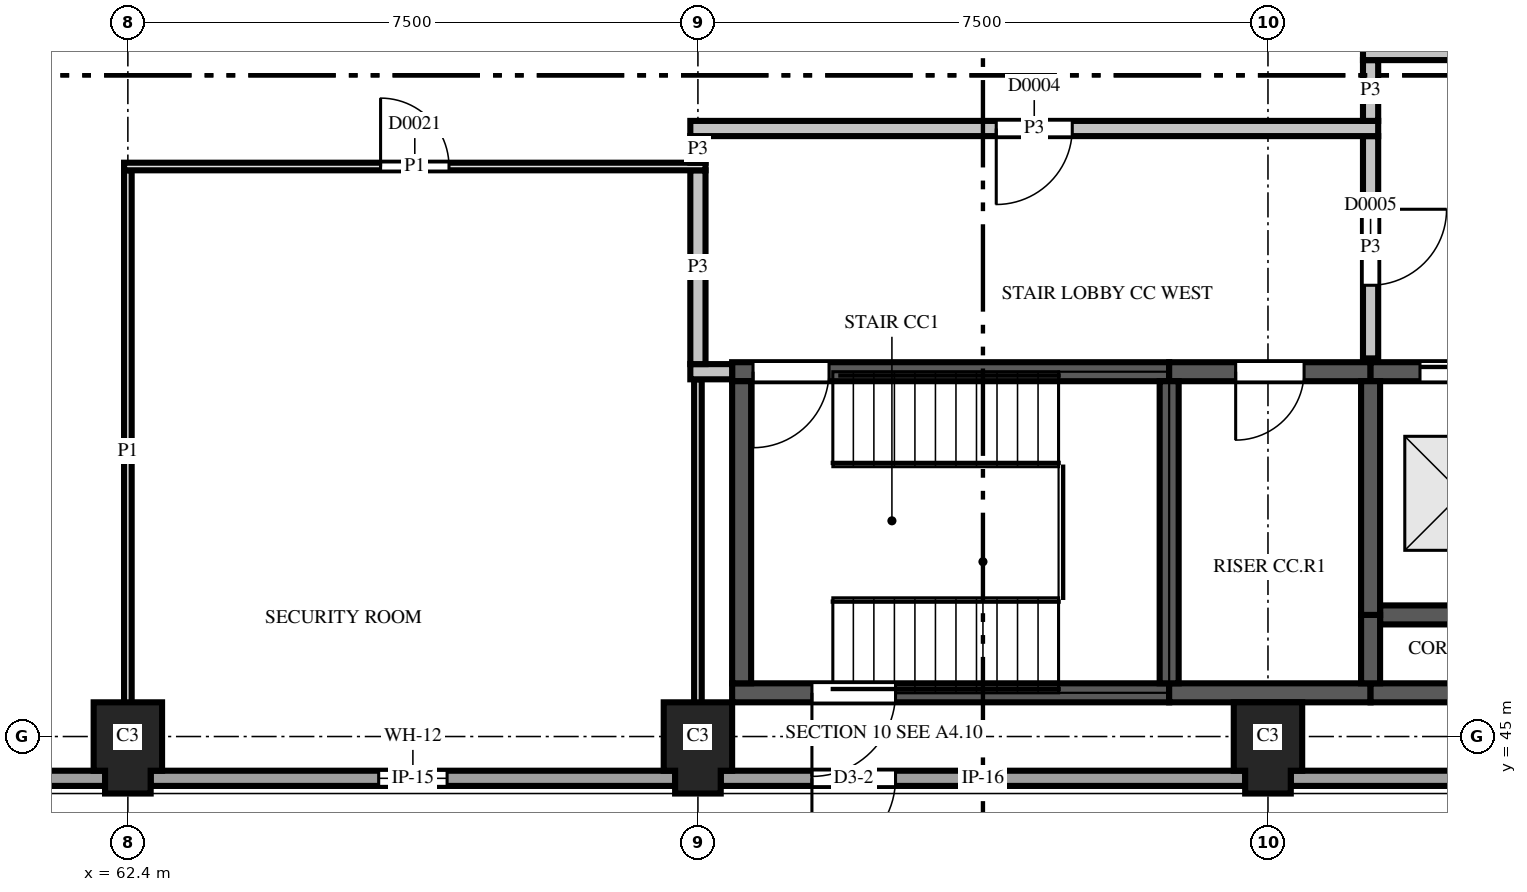
"""IFC4 building model, lengths in metres.
Left out: names, types, materials, properties, quantities, classifications, styles, units other than length and angle.
Written with IfcOpenShell. Run it as: python <this file> out.ifc"""

import sys

from ifc_helpers import new_model, si_unit, direction, frame, frame_2d, origin, place, context, subcontext, project, spatial, polyline, rectangle, outline, extrude, element, fill, save


model = new_model("IFC4")
c1 = context("Model", 3, precision=1e-05, world=origin(), true_north=direction((0.0, 1.0)))
c2 = subcontext(c1, "Body", "Model", "MODEL_VIEW")
j1 = project(units=[si_unit("LENGTHUNIT", "METRE"), si_unit("PLANEANGLEUNIT", "RADIAN")], contexts=[c1])
p1 = place(None, origin())
s1 = spatial("IfcSite", under=j1, at=p1, CompositionType="ELEMENT")
p2 = place(p1, origin())
s2 = spatial("IfcBuilding", under=s1, at=p2, CompositionType="ELEMENT")
p3 = place(p2, origin())
s3 = spatial("IfcBuildingStorey", under=s2, at=p3, CompositionType="ELEMENT", Elevation=0.0)
for number, where, z_axis, x_axis in (
    (1, (62.4, 45.0, 0.0), (0.0, 0.0, 1.0), (0.0, -1.0, 0.0)),
    (2, (69.9, 45.0, 0.0), (0.0, 0.0, 1.0), (0.0, -1.0, 0.0)),
    (3, (77.4, 45.0, 0.0), (0.0, 0.0, 1.0), (0.0, -1.0, 0.0)),
):
    element("IfcColumn", number, at=place(p3, frame(where, z_axis=z_axis, x_axis=x_axis)), inside=s3, PredefinedType="COLUMN", context=c2, shape_type="SweptSolid", body=[
        extrude(outline(polyline([(-0.45, -0.45), (0.45, -0.45), (0.45, -0.3), (0.75, -0.3), (0.75, 0.3), (0.45, 0.3), (0.45, 0.45), (-0.45, 0.45), (-0.45, -0.45)])), origin(), (0.0, 0.0, 1.0), 4.5),
    ])
p4 = place(p3, frame((70.35, 45.575, 0.0), z_axis=(0.0, 0.0, 1.0), x_axis=(1.0, 0.0, 0.0)))
e4 = element("IfcWall", 4, at=p4, inside=s3, PredefinedType="SHEAR", context=c2, shape_type="SweptSolid", body=[
    extrude(rectangle(XDim=5.75, YDim=0.25, at=frame_2d((2.875, 0.0))), origin(), (0.0, 0.0, 1.0), 4.5),
])
p5 = place(p4, frame((1.05, 0.0, 0.0)))
e5 = element("IfcOpeningElement", 5, at=p5, cuts=e4, PredefinedType="OPENING", context=c2, shape_type="SweptSolid", body=[
    extrude(rectangle(XDim=1.1, YDim=2.1, at=frame_2d((0.55, 1.05))), frame((0.0, 0.135, 0.0), z_axis=(0.0, -1.0, 0.0), x_axis=(1.0, 0.0, 0.0)), (0.0, 0.0, 1.0), 0.27),
])
p6 = place(p3, frame((76.1, 45.575, 0.0), z_axis=(0.0, 0.0, 1.0), x_axis=(1.0, 0.0, 0.0)))
e6 = element("IfcWall", 6, at=p6, inside=s3, PredefinedType="SHEAR", context=c2, shape_type="SweptSolid", body=[
    extrude(rectangle(XDim=2.65, YDim=0.25, at=frame_2d((1.325, 0.0))), origin(), (0.0, 0.0, 1.0), 4.5),
])
p7 = place(p3, frame((78.75, 45.575, 0.0), z_axis=(0.0, 0.0, 1.0), x_axis=(1.0, 0.0, 0.0)))
e7 = element("IfcWall", 7, at=p7, inside=s3, PredefinedType="SHEAR", context=c2, shape_type="SweptSolid", body=[
    extrude(rectangle(XDim=4.8, YDim=0.25, at=frame_2d((2.4, 0.0))), origin(), (0.0, 0.0, 1.0), 4.5),
])
p8 = place(p3, frame((78.875, 46.6, -1.4), z_axis=(0.0, 0.0, 1.0), x_axis=(1.0, 0.0, 0.0)))
e8 = element("IfcWall", 8, at=p8, inside=s3, PredefinedType="SHEAR", context=c2, shape_type="SweptSolid", body=[
    extrude(rectangle(XDim=2.275, YDim=0.25, at=frame_2d((1.137, 0.0))), origin(), (0.0, 0.0, 1.0), 5.9),
])
p9 = place(p3, frame((70.35, 49.8, 0.0), z_axis=(0.0, 0.0, 1.0), x_axis=(1.0, 0.0, 0.0)))
e9 = element("IfcWall", 9, at=p9, inside=s3, PredefinedType="SHEAR", context=c2, shape_type="SweptSolid", body=[
    extrude(rectangle(XDim=5.75, YDim=0.25, at=frame_2d((2.875, 0.0))), origin(), (0.0, 0.0, 1.0), 4.5),
])
p10 = place(p9, frame((0.275, 0.0, 0.0)))
e10 = element("IfcOpeningElement", 10, at=p10, cuts=e9, PredefinedType="OPENING", context=c2, shape_type="SweptSolid", body=[
    extrude(rectangle(XDim=1.0, YDim=2.1, at=frame_2d((0.5, 1.05))), frame((0.0, 0.135, 0.0), z_axis=(0.0, -1.0, 0.0), x_axis=(1.0, 0.0, 0.0)), (0.0, 0.0, 1.0), 0.27),
])
p11 = place(p3, frame((76.1, 49.8, 0.0), z_axis=(0.0, 0.0, 1.0), x_axis=(1.0, 0.0, 0.0)))
e11 = element("IfcWall", 11, at=p11, inside=s3, PredefinedType="SHEAR", context=c2, shape_type="SweptSolid", body=[
    extrude(rectangle(XDim=2.65, YDim=0.25, at=frame_2d((1.325, 0.0))), origin(), (0.0, 0.0, 1.0), 4.5),
])
p12 = place(p11, frame((0.875, 0.0, 0.0)))
e12 = element("IfcOpeningElement", 12, at=p12, cuts=e11, PredefinedType="OPENING", context=c2, shape_type="SweptSolid", body=[
    extrude(rectangle(XDim=0.9, YDim=2.1, at=frame_2d((0.45, 1.05))), frame((0.0, 0.135, 0.0), z_axis=(0.0, -1.0, 0.0), x_axis=(1.0, 0.0, 0.0)), (0.0, 0.0, 1.0), 0.27),
])
p13 = place(p3, frame((78.75, 49.8, -1.4), z_axis=(0.0, 0.0, 1.0), x_axis=(1.0, 0.0, 0.0)))
e13 = element("IfcWall", 13, at=p13, inside=s3, PredefinedType="SHEAR", context=c2, shape_type="SweptSolid", body=[
    extrude(rectangle(XDim=2.4, YDim=0.25, at=frame_2d((1.2, 0.0))), origin(), (0.0, 0.0, 1.0), 5.9),
])
p14 = place(p13, frame((0.65, 0.0, 1.4)))
e14 = element("IfcOpeningElement", 14, at=p14, cuts=e13, PredefinedType="OPENING", context=c2, shape_type="SweptSolid", body=[
    extrude(rectangle(XDim=1.1, YDim=2.1, at=frame_2d((0.55, 1.05))), frame((0.0, 0.135, 0.0), z_axis=(0.0, -1.0, 0.0), x_axis=(1.0, 0.0, 0.0)), (0.0, 0.0, 1.0), 0.27),
])
for number, where, z_axis, x_axis in (
    (15, (70.475, 45.7, 0.0), (0.0, 0.0, 1.0), (0.0, 1.0, 0.0)),
    (16, (76.1, 45.7, 0.0), (0.0, 0.0, 1.0), (0.0, 1.0, 0.0)),
):
    element("IfcWall", number, at=place(p3, frame(where, z_axis=z_axis, x_axis=x_axis)), inside=s3, PredefinedType="SHEAR", context=c2, shape_type="SweptSolid", body=[
        extrude(rectangle(XDim=3.975, YDim=0.25, at=frame_2d((1.988, 0.0))), origin(), (0.0, 0.0, 1.0), 4.5),
    ])
p15 = place(p3, frame((78.75, 45.7, 0.0), z_axis=(0.0, 0.0, 1.0), x_axis=(0.0, 1.0, 0.0)))
e17 = element("IfcWall", 17, at=p15, inside=s3, PredefinedType="SHEAR", context=c2, shape_type="SweptSolid", body=[
    extrude(rectangle(XDim=0.9, YDim=0.25, at=frame_2d((0.45, 0.0))), origin(), (0.0, 0.0, 1.0), 4.5),
])
p16 = place(p3, frame((78.75, 46.6, -1.4), z_axis=(0.0, 0.0, 1.0), x_axis=(0.0, 1.0, 0.0)))
e18 = element("IfcWall", 18, at=p16, inside=s3, PredefinedType="SHEAR", context=c2, shape_type="SweptSolid", body=[
    extrude(rectangle(XDim=3.075, YDim=0.25, at=frame_2d((1.538, 0.0))), origin(), (0.0, 0.0, 1.0), 5.9),
])
p17 = place(p3, frame((55.2, 44.45, 0.0), z_axis=(0.0, 0.0, 1.0), x_axis=(1.0, 0.0, 0.0)))
e19 = element("IfcWall", 19, at=p17, inside=s3, PredefinedType="SOLIDWALL", context=c2, shape_type="SweptSolid", body=[
    extrude(outline(polyline([(0.0, 0.0), (6.9, 0.0), (6.9, 3.1), (6.002, 3.1), (6.0, 2.4), (5.681, 2.56), (5.363, 2.695), (5.044, 2.806), (4.725, 2.895), (4.406, 2.963), (4.087, 3.012), (3.769, 3.041), (3.45, 3.05), (3.131, 3.041), (2.812, 3.012), (2.494, 2.963), (2.175, 2.895), (1.856, 2.806), (1.538, 2.695), (1.219, 2.56), (0.9, 2.4), (0.898, 3.1), (0.0, 3.1), (0.0, 0.0)])), frame((0.0, 0.1, 0.0), z_axis=(0.0, -1.0, 0.0), x_axis=(1.0, 0.0, 0.0)), (0.0, 0.0, 1.0), 0.2),
])
p18 = place(p17, frame((3.0, 0.0, 2.4)))
e20 = element("IfcOpeningElement", 20, at=p18, cuts=e19, PredefinedType="OPENING", context=c2, shape_type="SweptSolid", body=[
    extrude(rectangle(XDim=0.9, YDim=0.531, at=frame_2d((0.45, 0.266))), frame((0.0, 0.11, 0.0), z_axis=(0.0, -1.0, 0.0), x_axis=(1.0, 0.0, 0.0)), (0.0, 0.0, 1.0), 0.22),
])
p19 = place(p3, frame((62.7, 44.45, 0.0), z_axis=(0.0, 0.0, 1.0), x_axis=(1.0, 0.0, 0.0)))
e21 = element("IfcWall", 21, at=p19, inside=s3, PredefinedType="SOLIDWALL", context=c2, shape_type="SweptSolid", body=[
    extrude(outline(polyline([(0.0, 0.0), (6.9, 0.0), (6.9, 3.1), (6.002, 3.1), (6.0, 2.4), (5.681, 2.56), (5.363, 2.695), (5.044, 2.806), (4.725, 2.895), (4.406, 2.963), (4.087, 3.012), (3.769, 3.041), (3.45, 3.05), (3.131, 3.041), (2.812, 3.012), (2.494, 2.963), (2.175, 2.895), (1.856, 2.806), (1.538, 2.695), (1.219, 2.56), (0.9, 2.4), (0.898, 3.1), (0.0, 3.1), (0.0, 0.0)])), frame((0.0, 0.1, 0.0), z_axis=(0.0, -1.0, 0.0), x_axis=(1.0, 0.0, 0.0)), (0.0, 0.0, 1.0), 0.2),
])
p20 = place(p19, frame((3.0, 0.0, 2.4)))
e22 = element("IfcOpeningElement", 22, at=p20, cuts=e21, PredefinedType="OPENING", context=c2, shape_type="SweptSolid", body=[
    extrude(rectangle(XDim=0.9, YDim=0.531, at=frame_2d((0.45, 0.266))), frame((0.0, 0.11, 0.0), z_axis=(0.0, -1.0, 0.0), x_axis=(1.0, 0.0, 0.0)), (0.0, 0.0, 1.0), 0.22),
])
p21 = place(p3, frame((70.2, 44.45, 0.0), z_axis=(0.0, 0.0, 1.0), x_axis=(1.0, 0.0, 0.0)))
e23 = element("IfcWall", 23, at=p21, inside=s3, PredefinedType="SOLIDWALL", context=c2, shape_type="SweptSolid", body=[
    extrude(outline(polyline([(0.0, 0.0), (6.9, 0.0), (6.9, 3.1), (6.002, 3.1), (6.0, 2.4), (5.681, 2.56), (5.363, 2.695), (5.044, 2.806), (4.725, 2.895), (4.406, 2.963), (4.087, 3.012), (3.769, 3.041), (3.45, 3.05), (3.131, 3.041), (2.812, 3.012), (2.494, 2.963), (2.175, 2.895), (1.856, 2.806), (1.538, 2.695), (1.219, 2.56), (0.9, 2.4), (0.898, 3.1), (0.0, 3.1), (0.0, 0.0)])), frame((0.0, 0.1, 0.0), z_axis=(0.0, -1.0, 0.0), x_axis=(1.0, 0.0, 0.0)), (0.0, 0.0, 1.0), 0.2),
])
p22 = place(p21, frame((1.2, 0.0, 0.0)))
e24 = element("IfcOpeningElement", 24, at=p22, cuts=e23, PredefinedType="OPENING", context=c2, shape_type="SweptSolid", body=[
    extrude(rectangle(XDim=1.1, YDim=2.1, at=frame_2d((0.55, 1.05))), frame((0.0, 0.11, 0.0), z_axis=(0.0, -1.0, 0.0), x_axis=(1.0, 0.0, 0.0)), (0.0, 0.0, 1.0), 0.22),
])
p23 = place(p3, frame((77.7, 44.45, 0.0), z_axis=(0.0, 0.0, 1.0), x_axis=(1.0, 0.0, 0.0)))
e25 = element("IfcWall", 25, at=p23, inside=s3, PredefinedType="SOLIDWALL", context=c2, shape_type="SweptSolid", body=[
    extrude(outline(polyline([(0.0, 0.0), (6.9, 0.0), (6.9, 3.1), (6.002, 3.1), (6.0, 2.4), (5.681, 2.56), (5.363, 2.695), (5.044, 2.806), (4.725, 2.895), (4.406, 2.963), (4.087, 3.012), (3.769, 3.041), (3.45, 3.05), (3.131, 3.041), (2.812, 3.012), (2.494, 2.963), (2.175, 2.895), (1.856, 2.806), (1.538, 2.695), (1.219, 2.56), (0.9, 2.4), (0.898, 3.1), (0.0, 3.1), (0.0, 0.0)])), frame((0.0, 0.1, 0.0), z_axis=(0.0, -1.0, 0.0), x_axis=(1.0, 0.0, 0.0)), (0.0, 0.0, 1.0), 0.2),
])
p24 = place(p23, frame((3.0, 0.0, 2.4)))
e26 = element("IfcOpeningElement", 26, at=p24, cuts=e25, PredefinedType="OPENING", context=c2, shape_type="SweptSolid", body=[
    extrude(rectangle(XDim=0.9, YDim=0.531, at=frame_2d((0.45, 0.266))), frame((0.0, 0.11, 0.0), z_axis=(0.0, -1.0, 0.0), x_axis=(1.0, 0.0, 0.0)), (0.0, 0.0, 1.0), 0.22),
])
p25 = place(p3, frame((69.9, 45.06, 0.0), z_axis=(0.0, 0.0, 1.0), x_axis=(0.0, 1.0, 0.0)))
e27 = element("IfcWall", 27, at=p25, inside=s3, PredefinedType="PARTITIONING", context=c2, shape_type="SweptSolid", body=[
    extrude(rectangle(XDim=4.64, YDim=0.1, at=frame_2d((2.32, 0.0))), origin(), (0.0, 0.0, 1.0), 3.68),
])
p26 = place(p3, frame((69.8, 49.8, 0.0), z_axis=(0.0, 0.0, 1.0), x_axis=(1.0, 0.0, 0.0)))
e28 = element("IfcWall", 28, at=p26, inside=s3, PredefinedType="PARTITIONING", context=c2, shape_type="SweptSolid", body=[
    extrude(rectangle(XDim=0.55, YDim=0.2, at=frame_2d((0.275, 0.0))), origin(), (0.0, 0.0, 1.0), 3.68),
])
p27 = place(p3, frame((78.75, 49.975, 0.0), z_axis=(0.0, 0.0, 1.0), x_axis=(0.0, 1.0, 0.0)))
e29 = element("IfcWall", 29, at=p27, inside=s3, PredefinedType="PARTITIONING", context=c2, shape_type="SweptSolid", body=[
    extrude(rectangle(XDim=2.925, YDim=0.2, at=frame_2d((1.462, 0.0))), origin(), (0.0, 0.0, 1.0), 3.68),
])
p28 = place(p27, frame((0.962, 0.0, 0.0)))
e30 = element("IfcOpeningElement", 30, at=p28, cuts=e29, PredefinedType="OPENING", context=c2, shape_type="SweptSolid", body=[
    extrude(rectangle(XDim=1.0, YDim=2.1, at=frame_2d((0.5, 1.05))), frame((0.0, 0.11, 0.0), z_axis=(0.0, -1.0, 0.0), x_axis=(1.0, 0.0, 0.0)), (0.0, 0.0, 1.0), 0.22),
])
p29 = place(p3, frame((62.4, 52.45, 0.0), z_axis=(0.0, 0.0, 1.0), x_axis=(0.0, -1.0, 0.0)))
e31 = element("IfcWall", 31, at=p29, inside=s3, PredefinedType="PARTITIONING", context=c2, shape_type="SweptSolid", body=[
    extrude(rectangle(XDim=7.39, YDim=0.1, at=frame_2d((3.695, 0.0))), origin(), (0.0, 0.0, 1.0), 3.68),
])
p30 = place(p3, frame((69.9, 52.45, 0.0), z_axis=(0.0, 0.0, 1.0), x_axis=(0.0, -1.0, 0.0)))
e32 = element("IfcWall", 32, at=p30, inside=s3, PredefinedType="PARTITIONING", context=c2, shape_type="SweptSolid", body=[
    extrude(rectangle(XDim=2.55, YDim=0.2, at=frame_2d((1.275, 0.0))), origin(), (0.0, 0.0, 1.0), 3.68),
])
p31 = place(p3, frame((70.0, 52.5, 0.0), z_axis=(0.0, 0.0, 1.0), x_axis=(-1.0, 0.0, 0.0)))
e33 = element("IfcWall", 33, at=p31, inside=s3, PredefinedType="PARTITIONING", context=c2, shape_type="SweptSolid", body=[
    extrude(rectangle(XDim=7.65, YDim=0.1, at=frame_2d((3.825, 0.0))), origin(), (0.0, 0.0, 1.0), 3.68),
])
p32 = place(p31, frame((3.375, 0.0, 0.0)))
e34 = element("IfcOpeningElement", 34, at=p32, cuts=e33, PredefinedType="OPENING", context=c2, shape_type="SweptSolid", body=[
    extrude(rectangle(XDim=0.9, YDim=2.1, at=frame_2d((0.45, 1.05))), frame((0.0, 0.06, 0.0), z_axis=(0.0, -1.0, 0.0), x_axis=(1.0, 0.0, 0.0)), (0.0, 0.0, 1.0), 0.12),
])
p33 = place(p3, frame((69.9, 52.9, 0.0), z_axis=(0.0, 0.0, 1.0), x_axis=(0.0, -1.0, 0.0)))
e35 = element("IfcWall", 35, at=p33, inside=s3, PredefinedType="PARTITIONING", context=c2, shape_type="SweptSolid", body=[
    extrude(rectangle(XDim=0.35, YDim=0.2, at=frame_2d((0.175, 0.0))), origin(), (0.0, 0.0, 1.0), 3.68),
])
p34 = place(p3, frame((78.85, 53.0, 0.0), z_axis=(0.0, 0.0, 1.0), x_axis=(-1.0, 0.0, 0.0)))
e36 = element("IfcWall", 36, at=p34, inside=s3, PredefinedType="PARTITIONING", context=c2, shape_type="SweptSolid", body=[
    extrude(rectangle(XDim=9.05, YDim=0.2, at=frame_2d((4.525, 0.0))), origin(), (0.0, 0.0, 1.0), 3.68),
])
p35 = place(p34, frame((4.025, 0.0, 0.0)))
e37 = element("IfcOpeningElement", 37, at=p35, cuts=e36, PredefinedType="OPENING", context=c2, shape_type="SweptSolid", body=[
    extrude(rectangle(XDim=1.0, YDim=2.1, at=frame_2d((0.5, 1.05))), frame((0.0, 0.11, 0.0), z_axis=(0.0, -1.0, 0.0), x_axis=(1.0, 0.0, 0.0)), (0.0, 0.0, 1.0), 0.22),
])
p36 = place(p3, frame((78.75, 53.9, 0.0), z_axis=(0.0, 0.0, 1.0), x_axis=(0.0, -1.0, 0.0)))
e38 = element("IfcWall", 38, at=p36, inside=s3, PredefinedType="PARTITIONING", context=c2, shape_type="SweptSolid", body=[
    extrude(rectangle(XDim=0.8, YDim=0.2, at=frame_2d((0.4, 0.0))), origin(), (0.0, 0.0, 1.0), 3.68),
])
p37 = place(p3, frame((83.65, 54.0, 0.0), z_axis=(0.0, 0.0, 1.0), x_axis=(-1.0, 0.0, 0.0)))
e39 = element("IfcWall", 39, at=p37, inside=s3, PredefinedType="PARTITIONING", context=c2, shape_type="SweptSolid", body=[
    extrude(rectangle(XDim=5.0, YDim=0.2, at=frame_2d((2.5, 0.0))), origin(), (0.0, 0.0, 1.0), 3.68),
])
p38 = place(p20, origin())
e40 = element("IfcWindow", 40, at=p38, inside=s3, PartitioningType="SINGLE_PANEL", PredefinedType="WINDOW", context=c2, shape_type="SweptSolid", body=[
    extrude(rectangle(XDim=0.9, YDim=0.531, at=frame_2d((0.45, 0.266))), frame((0.0, 0.03, 0.0), z_axis=(0.0, -1.0, 0.0), x_axis=(1.0, 0.0, 0.0)), (0.0, 0.0, 1.0), 0.06),
])
fill(e22, e40)
p39 = place(p22, frame((1.1, 0.0, 0.0), z_axis=(0.0, 0.0, 1.0), x_axis=(-1.0, 0.0, 0.0)))
e41 = element("IfcDoor", 41, at=p39, inside=s3, OperationType="SINGLE_SWING_LEFT", PredefinedType="DOOR", context=c2, shape_type="SweptSolid", body=[
    extrude(rectangle(XDim=1.1, YDim=2.1, at=frame_2d((0.55, 1.05))), frame((0.0, 0.025, 0.0), z_axis=(0.0, -1.0, 0.0), x_axis=(1.0, 0.0, 0.0)), (0.0, 0.0, 1.0), 0.05),
])
fill(e24, e41)
p40 = place(p5, frame((1.1, 0.0, 0.0), z_axis=(0.0, 0.0, 1.0), x_axis=(-1.0, 0.0, 0.0)))
e42 = element("IfcDoor", 42, at=p40, inside=s3, OperationType="SINGLE_SWING_LEFT", PredefinedType="DOOR", context=c2, shape_type="SweptSolid", body=[
    extrude(rectangle(XDim=1.1, YDim=2.1, at=frame_2d((0.55, 1.05))), frame((0.0, 0.025, 0.0), z_axis=(0.0, -1.0, 0.0), x_axis=(1.0, 0.0, 0.0)), (0.0, 0.0, 1.0), 0.05),
])
fill(e5, e42)
p41 = place(p35, origin())
e43 = element("IfcDoor", 43, at=p41, inside=s3, OperationType="SINGLE_SWING_LEFT", PredefinedType="DOOR", context=c2, shape_type="SweptSolid", body=[
    extrude(rectangle(XDim=1.0, YDim=2.1, at=frame_2d((0.5, 1.05))), frame((0.0, 0.025, 0.0), z_axis=(0.0, -1.0, 0.0), x_axis=(1.0, 0.0, 0.0)), (0.0, 0.0, 1.0), 0.05),
])
fill(e37, e43)
p42 = place(p28, origin())
e44 = element("IfcDoor", 44, at=p42, inside=s3, OperationType="SINGLE_SWING_RIGHT", PredefinedType="DOOR", context=c2, shape_type="SweptSolid", body=[
    extrude(rectangle(XDim=1.0, YDim=2.1, at=frame_2d((0.5, 1.05))), frame((0.0, 0.025, 0.0), z_axis=(0.0, -1.0, 0.0), x_axis=(1.0, 0.0, 0.0)), (0.0, 0.0, 1.0), 0.05),
])
fill(e30, e44)
p43 = place(p32, origin())
e45 = element("IfcDoor", 45, at=p43, inside=s3, OperationType="SINGLE_SWING_RIGHT", PredefinedType="DOOR", context=c2, shape_type="SweptSolid", body=[
    extrude(rectangle(XDim=0.9, YDim=2.1, at=frame_2d((0.45, 1.05))), frame((0.0, 0.025, 0.0), z_axis=(0.0, -1.0, 0.0), x_axis=(1.0, 0.0, 0.0)), (0.0, 0.0, 1.0), 0.05),
])
fill(e34, e45)
p44 = place(p14, origin())
e46 = element("IfcDoor", 46, at=p44, inside=s3, OperationType="SLIDING_TO_LEFT", PredefinedType="DOOR", context=c2, shape_type="SweptSolid", body=[
    extrude(rectangle(XDim=1.1, YDim=2.1, at=frame_2d((0.55, 1.05))), frame((0.0, 0.025, 0.0), z_axis=(0.0, -1.0, 0.0), x_axis=(1.0, 0.0, 0.0)), (0.0, 0.0, 1.0), 0.05),
])
fill(e14, e46)
p45 = place(p10, origin())
e47 = element("IfcDoor", 47, at=p45, inside=s3, OperationType="SINGLE_SWING_LEFT", PredefinedType="DOOR", context=c2, shape_type="SweptSolid", body=[
    extrude(rectangle(XDim=1.0, YDim=2.1, at=frame_2d((0.5, 1.05))), frame((0.0, 0.025, 0.0), z_axis=(0.0, -1.0, 0.0), x_axis=(1.0, 0.0, 0.0)), (0.0, 0.0, 1.0), 0.05),
])
fill(e10, e47)
p46 = place(p12, origin())
e48 = element("IfcDoor", 48, at=p46, inside=s3, OperationType="SINGLE_SWING_LEFT", PredefinedType="DOOR", context=c2, shape_type="SweptSolid", body=[
    extrude(rectangle(XDim=0.9, YDim=2.1, at=frame_2d((0.45, 1.05))), frame((0.0, 0.025, 0.0), z_axis=(0.0, -1.0, 0.0), x_axis=(1.0, 0.0, 0.0)), (0.0, 0.0, 1.0), 0.05),
])
fill(e12, e48)
save(model, sys.argv[1])
